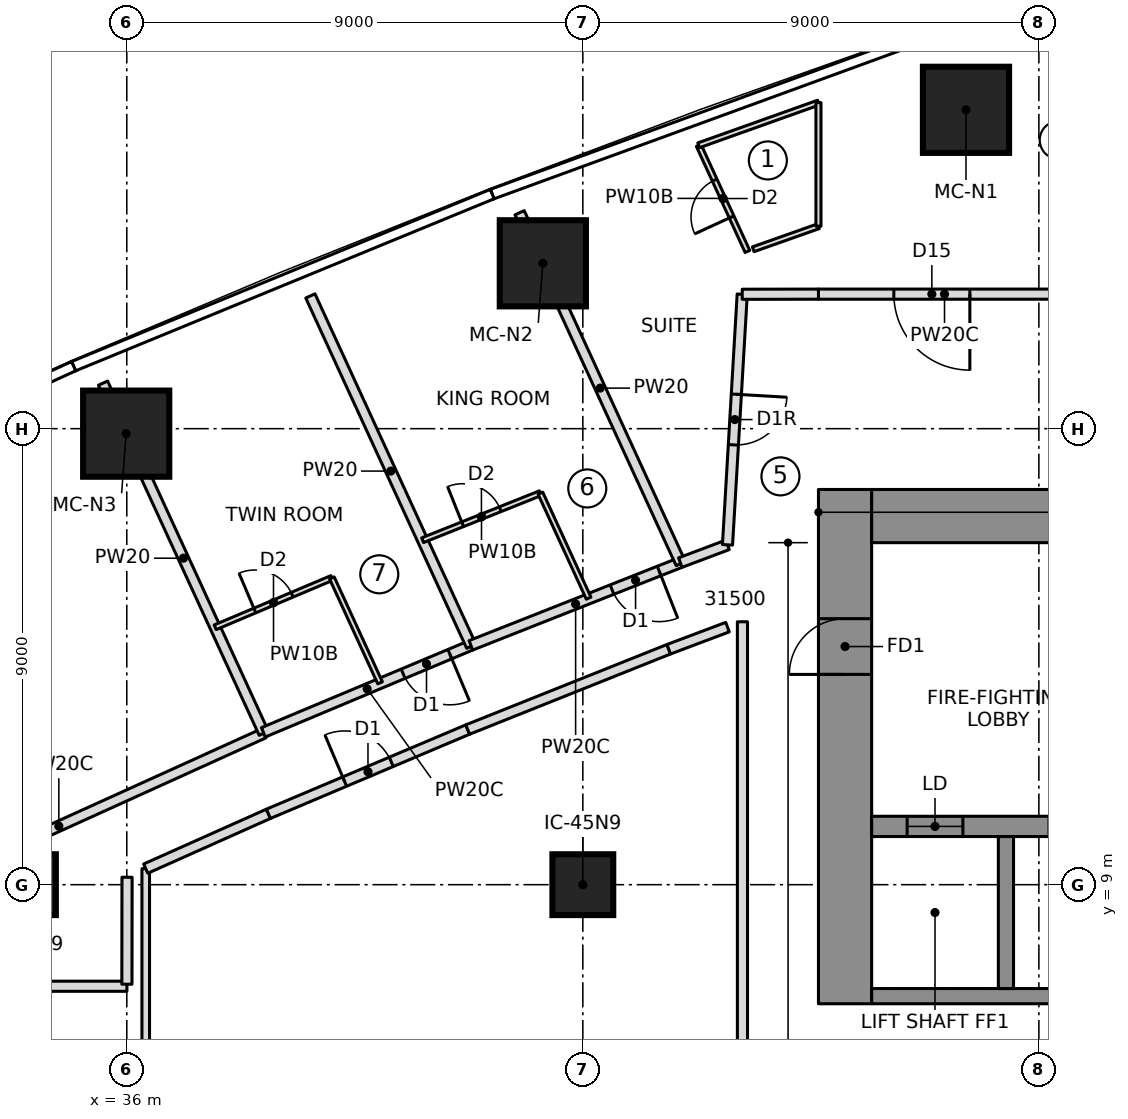
"""IFC4 building model, lengths in metres.
Left out: names, types, materials, properties, quantities, classifications, styles, units other than length and angle.
Written with IfcOpenShell. Run it as: python <this file> out.ifc"""

import sys

from ifc_helpers import new_model, si_unit, direction, frame, frame_2d, origin, origin_2d, place, context, subcontext, project, spatial, rectangle, extrude, element, fill, save


model = new_model("IFC4")
c1 = context("Model", 3, precision=1e-05, world=origin(), true_north=direction((0.0, 1.0)))
c2 = subcontext(c1, "Body", "Model", "MODEL_VIEW")
j1 = project(units=[si_unit("LENGTHUNIT", "METRE"), si_unit("PLANEANGLEUNIT", "RADIAN")], contexts=[c1])
p1 = place(None, origin())
s1 = spatial("IfcSite", under=j1, at=p1, CompositionType="ELEMENT")
p2 = place(p1, origin())
s2 = spatial("IfcBuilding", under=s1, at=p2, CompositionType="ELEMENT")
p3 = place(p2, frame((0.0, 0.0, 99.1)))
s3 = spatial("IfcBuildingStorey", under=s2, at=p3, CompositionType="ELEMENT", Elevation=99.1)
p4 = place(p3, frame((50.175, 6.65, 0.0), z_axis=(0.0, 0.0, 1.0), x_axis=(0.0, 1.0, 0.0)))
e1 = element("IfcWall", 1, at=p4, inside=s3, PredefinedType="SHEAR", context=c2, shape_type="SweptSolid", body=[
    extrude(rectangle(XDim=10.15, YDim=1.05, at=frame_2d((5.075, 0.0))), origin(), (0.0, 0.0, 1.0), 3.55),
])
p5 = place(p4, frame((6.5, 0.0, 0.0)))
e2 = element("IfcOpeningElement", 2, at=p5, cuts=e1, PredefinedType="OPENING", context=c2, shape_type="SweptSolid", body=[
    extrude(rectangle(XDim=1.1, YDim=2.1, at=frame_2d((0.55, 1.05))), frame((0.0, 0.535, 0.0), z_axis=(0.0, -1.0, 0.0), x_axis=(1.0, 0.0, 0.0)), (0.0, 0.0, 1.0), 1.07),
])
p6 = place(p3, frame((50.7, 16.275, 0.0), z_axis=(0.0, 0.0, 1.0), x_axis=(1.0, 0.0, 0.0)))
e3 = element("IfcWall", 3, at=p6, inside=s3, PredefinedType="SHEAR", context=c2, shape_type="SweptSolid", body=[
    extrude(rectangle(XDim=14.07, YDim=1.05, at=frame_2d((7.035, 0.0))), origin(), (0.0, 0.0, 1.0), 3.55),
])
p7 = place(p3, frame((50.7, 10.15, 0.0), z_axis=(0.0, 0.0, 1.0), x_axis=(1.0, 0.0, 0.0)))
e4 = element("IfcWall", 4, at=p7, inside=s3, PredefinedType="SHEAR", context=c2, shape_type="SweptSolid", body=[
    extrude(rectangle(XDim=13.02, YDim=0.4, at=frame_2d((6.51, 0.0))), origin(), (0.0, 0.0, 1.0), 3.55),
])
p8 = place(p7, frame((0.7, 0.0, 0.0)))
e5 = element("IfcOpeningElement", 5, at=p8, cuts=e4, PredefinedType="OPENING", context=c2, shape_type="SweptSolid", body=[
    extrude(rectangle(XDim=1.1, YDim=2.1, at=frame_2d((0.55, 1.05))), frame((0.0, 0.21, 0.0), z_axis=(0.0, -1.0, 0.0), x_axis=(1.0, 0.0, 0.0)), (0.0, 0.0, 1.0), 0.42),
])
p9 = place(p7, frame((3.5, 0.0, 0.0)))
e6 = element("IfcOpeningElement", 6, at=p9, cuts=e4, PredefinedType="OPENING", context=c2, shape_type="SweptSolid", body=[
    extrude(rectangle(XDim=1.1, YDim=2.1, at=frame_2d((0.55, 1.05))), frame((0.0, 0.21, 0.0), z_axis=(0.0, -1.0, 0.0), x_axis=(1.0, 0.0, 0.0)), (0.0, 0.0, 1.0), 0.42),
])
p10 = place(p3, frame((50.7, 6.8, 0.0), z_axis=(0.0, 0.0, 1.0), x_axis=(1.0, 0.0, 0.0)))
e7 = element("IfcWall", 7, at=p10, inside=s3, PredefinedType="SHEAR", context=c2, shape_type="SweptSolid", body=[
    extrude(rectangle(XDim=10.9, YDim=0.3, at=frame_2d((5.45, 0.0))), origin(), (0.0, 0.0, 1.0), 3.55),
])
p11 = place(p10, frame((6.3, 0.0, 0.0)))
e8 = element("IfcOpeningElement", 8, at=p11, cuts=e7, PredefinedType="OPENING", context=c2, shape_type="SweptSolid", body=[
    extrude(rectangle(XDim=1.1, YDim=2.1, at=frame_2d((0.55, 1.05))), frame((0.0, 0.16, 0.0), z_axis=(0.0, -1.0, 0.0), x_axis=(1.0, 0.0, 0.0)), (0.0, 0.0, 1.0), 0.32),
])
p12 = place(p10, frame((9.1, 0.0, 0.0)))
e9 = element("IfcOpeningElement", 9, at=p12, cuts=e7, PredefinedType="OPENING", context=c2, shape_type="SweptSolid", body=[
    extrude(rectangle(XDim=1.1, YDim=2.1, at=frame_2d((0.55, 1.05))), frame((0.0, 0.16, 0.0), z_axis=(0.0, -1.0, 0.0), x_axis=(1.0, 0.0, 0.0)), (0.0, 0.0, 1.0), 0.32),
])
p13 = place(p3, frame((53.35, 6.95, 0.0), z_axis=(0.0, 0.0, 1.0), x_axis=(0.0, 1.0, 0.0)))
e10 = element("IfcWall", 10, at=p13, inside=s3, PredefinedType="SHEAR", context=c2, shape_type="SweptSolid", body=[
    extrude(rectangle(XDim=3.0, YDim=0.3, at=frame_2d((1.5, 0.0))), origin(), (0.0, 0.0, 1.0), 3.55),
])
for number, where, z_axis, x_axis in (
    (11, (52.562, 24.293, 0.0), (0.0, 0.0, 1.0), (1.0, 0.0, 0.0)),
    (12, (44.211, 21.264, 0.0), (0.0, 0.0, 1.0), (1.0, 0.0, 0.0)),
    (13, (35.988, 17.902, 0.0), (0.0, 0.0, 1.0), (1.0, 0.0, 0.0)),
):
    element("IfcColumn", number, at=place(p3, frame(where, z_axis=z_axis, x_axis=x_axis)), inside=s3, PredefinedType="COLUMN", context=c2, shape_type="SweptSolid", body=[
        extrude(rectangle(XDim=1.7, YDim=1.7, at=origin_2d()), origin(), (0.0, 0.0, 1.0), 3.55),
    ])
for number, where, z_axis, x_axis in (
    (14, (34.0, 9.0, 0.0), (0.0, 0.0, 1.0), (1.0, 0.0, 0.0)),
    (15, (45.0, 9.0, 0.0), (0.0, 0.0, 1.0), (1.0, 0.0, 0.0)),
):
    element("IfcColumn", number, at=place(p3, frame(where, z_axis=z_axis, x_axis=x_axis)), inside=s3, PredefinedType="COLUMN", context=c2, shape_type="SweptSolid", body=[
        extrude(rectangle(XDim=1.2, YDim=1.2, at=origin_2d()), origin(), (0.0, 0.0, 1.0), 3.55),
    ])
p14 = place(p3, frame((30.614, 8.32, 0.0), z_axis=(0.0, 0.0, 1.0), x_axis=(0.910751030363, 0.41295588226, 0.0)))
e16 = element("IfcWall", 16, at=p14, inside=s3, PredefinedType="PARTITIONING", context=c2, shape_type="SweptSolid", body=[
    extrude(rectangle(XDim=8.883, YDim=0.2, at=frame_2d((4.442, 0.0))), origin(), (0.0, 0.0, 1.0), 3.25),
])
p15 = place(p14, frame((0.45, 0.0, 0.0)))
e17 = element("IfcOpeningElement", 17, at=p15, cuts=e16, PredefinedType="OPENING", context=c2, shape_type="SweptSolid", body=[
    extrude(rectangle(XDim=1.0, YDim=2.1, at=frame_2d((0.5, 1.05))), frame((0.0, 0.11, 0.0), z_axis=(0.0, -1.0, 0.0), x_axis=(1.0, 0.0, 0.0)), (0.0, 0.0, 1.0), 0.22),
])
p16 = place(p3, frame((38.704, 11.989, 0.0), z_axis=(0.0, 0.0, 1.0), x_axis=(-0.417416334044, 0.908715359215, 0.0)))
e18 = element("IfcWall", 18, at=p16, inside=s3, PredefinedType="PARTITIONING", context=c2, shape_type="SweptSolid", body=[
    extrude(rectangle(XDim=7.604, YDim=0.2, at=frame_2d((3.802, 0.0))), origin(), (0.0, 0.0, 1.0), 3.25),
])
p17 = place(p3, frame((42.791, 13.724, 0.0), z_axis=(0.0, 0.0, 1.0), x_axis=(-0.922230433067, -0.386640696675, 0.0)))
e19 = element("IfcWall", 19, at=p17, inside=s3, PredefinedType="PARTITIONING", context=c2, shape_type="SweptSolid", body=[
    extrude(rectangle(XDim=4.44, YDim=0.2, at=frame_2d((2.22, 0.0))), origin(), (0.0, 0.0, 1.0), 3.25),
])
p18 = place(p17, frame((0.45, 0.0, 0.0)))
e20 = element("IfcOpeningElement", 20, at=p18, cuts=e19, PredefinedType="OPENING", context=c2, shape_type="SweptSolid", body=[
    extrude(rectangle(XDim=1.0, YDim=2.1, at=frame_2d((0.5, 1.05))), frame((0.0, 0.11, 0.0), z_axis=(0.0, -1.0, 0.0), x_axis=(1.0, 0.0, 0.0)), (0.0, 0.0, 1.0), 0.22),
])
p19 = place(p3, frame((37.744, 14.08, 0.0), z_axis=(0.0, 0.0, 1.0), x_axis=(0.921042675983, 0.38946166566, 0.0)))
e21 = element("IfcWall", 21, at=p19, inside=s3, PredefinedType="PARTITIONING", context=c2, shape_type="SweptSolid", body=[
    extrude(rectangle(XDim=2.501, YDim=0.1, at=frame_2d((1.25, 0.0))), origin(), (0.0, 0.0, 1.0), 3.25),
])
p20 = place(p19, frame((0.85, 0.0, 0.0)))
e22 = element("IfcOpeningElement", 22, at=p20, cuts=e21, PredefinedType="OPENING", context=c2, shape_type="SweptSolid", body=[
    extrude(rectangle(XDim=0.8, YDim=2.1, at=frame_2d((0.4, 1.05))), frame((0.0, 0.06, 0.0), z_axis=(0.0, -1.0, 0.0), x_axis=(1.0, 0.0, 0.0)), (0.0, 0.0, 1.0), 0.12),
])
p21 = place(p3, frame((40.048, 15.054, 0.0), z_axis=(0.0, 0.0, 1.0), x_axis=(0.417433204355, -0.908707609686, 0.0)))
e23 = element("IfcWall", 23, at=p21, inside=s3, PredefinedType="PARTITIONING", context=c2, shape_type="SweptSolid", body=[
    extrude(rectangle(XDim=2.278, YDim=0.1, at=frame_2d((1.139, 0.0))), origin(), (0.0, 0.0, 1.0), 3.25),
])
p22 = place(p3, frame((42.799, 13.705, 0.0), z_axis=(0.0, 0.0, 1.0), x_axis=(-0.417427858403, 0.908710065438, 0.0)))
e24 = element("IfcWall", 24, at=p22, inside=s3, PredefinedType="PARTITIONING", context=c2, shape_type="SweptSolid", body=[
    extrude(rectangle(XDim=7.61, YDim=0.2, at=frame_2d((3.805, 0.0))), origin(), (0.0, 0.0, 1.0), 3.25),
])
p23 = place(p3, frame((46.924, 15.357, 0.0), z_axis=(0.0, 0.0, 1.0), x_axis=(-0.930040633249, -0.367456692014, 0.0)))
e25 = element("IfcWall", 25, at=p23, inside=s3, PredefinedType="PARTITIONING", context=c2, shape_type="SweptSolid", body=[
    extrude(rectangle(XDim=4.444, YDim=0.2, at=frame_2d((2.222, 0.0))), origin(), (0.0, 0.0, 1.0), 3.25),
])
p24 = place(p23, frame((0.45, 0.0, 0.0)))
e26 = element("IfcOpeningElement", 26, at=p24, cuts=e25, PredefinedType="OPENING", context=c2, shape_type="SweptSolid", body=[
    extrude(rectangle(XDim=1.0, YDim=2.1, at=frame_2d((0.5, 1.05))), frame((0.0, 0.11, 0.0), z_axis=(0.0, -1.0, 0.0), x_axis=(1.0, 0.0, 0.0)), (0.0, 0.0, 1.0), 0.22),
])
p25 = place(p3, frame((41.838, 15.798, 0.0), z_axis=(0.0, 0.0, 1.0), x_axis=(0.928638024739, 0.370987087388, 0.0)))
e27 = element("IfcWall", 27, at=p25, inside=s3, PredefinedType="PARTITIONING", context=c2, shape_type="SweptSolid", body=[
    extrude(rectangle(XDim=2.503, YDim=0.1, at=frame_2d((1.252, 0.0))), origin(), (0.0, 0.0, 1.0), 3.25),
])
p26 = place(p25, frame((0.85, 0.0, 0.0)))
e28 = element("IfcOpeningElement", 28, at=p26, cuts=e27, PredefinedType="OPENING", context=c2, shape_type="SweptSolid", body=[
    extrude(rectangle(XDim=0.8, YDim=2.1, at=frame_2d((0.4, 1.05))), frame((0.0, 0.06, 0.0), z_axis=(0.0, -1.0, 0.0), x_axis=(1.0, 0.0, 0.0)), (0.0, 0.0, 1.0), 0.12),
])
p27 = place(p3, frame((44.163, 16.727, 0.0), z_axis=(0.0, 0.0, 1.0), x_axis=(0.417373525971, -0.908735021785, 0.0)))
e29 = element("IfcWall", 29, at=p27, inside=s3, PredefinedType="PARTITIONING", context=c2, shape_type="SweptSolid", body=[
    extrude(rectangle(XDim=2.28, YDim=0.1, at=frame_2d((1.14, 0.0))), origin(), (0.0, 0.0, 1.0), 3.25),
])
p28 = place(p3, frame((46.933, 15.339, 0.0), z_axis=(0.0, 0.0, 1.0), x_axis=(-0.417437957167, 0.908705426371, 0.0)))
e30 = element("IfcWall", 30, at=p28, inside=s3, PredefinedType="PARTITIONING", context=c2, shape_type="SweptSolid", body=[
    extrude(rectangle(XDim=7.619, YDim=0.2, at=frame_2d((3.81, 0.0))), origin(), (0.0, 0.0, 1.0), 3.25),
])
p29 = place(p3, frame((49.65, 21.996, 0.0), z_axis=(0.0, 0.0, 1.0), x_axis=(-0.942692856107, -0.333661773425, 0.0)))
e31 = element("IfcWall", 31, at=p29, inside=s3, PredefinedType="PARTITIONING", context=c2, shape_type="SweptSolid", body=[
    extrude(rectangle(XDim=1.365, YDim=0.1, at=frame_2d((0.683, 0.0))), origin(), (0.0, 0.0, 1.0), 3.25),
])
p30 = place(p3, frame((48.249, 21.497, 0.0), z_axis=(0.0, 0.0, 1.0), x_axis=(-0.41749308293, 0.908680100864, 0.0)))
e32 = element("IfcWall", 32, at=p30, inside=s3, PredefinedType="PARTITIONING", context=c2, shape_type="SweptSolid", body=[
    extrude(rectangle(XDim=2.306, YDim=0.1, at=frame_2d((1.153, 0.0))), origin(), (0.0, 0.0, 1.0), 3.25),
])
p31 = place(p30, frame((0.75, 0.0, 0.0)))
e33 = element("IfcOpeningElement", 33, at=p31, cuts=e32, PredefinedType="OPENING", context=c2, shape_type="SweptSolid", body=[
    extrude(rectangle(XDim=0.8, YDim=2.1, at=frame_2d((0.4, 1.05))), frame((0.0, 0.06, 0.0), z_axis=(0.0, -1.0, 0.0), x_axis=(1.0, 0.0, 0.0)), (0.0, 0.0, 1.0), 0.12),
])
p32 = place(p3, frame((36.374, -9.317, 0.0), z_axis=(0.0, 0.0, 1.0), x_axis=(0.0, 1.0, 0.0)))
e34 = element("IfcWall", 34, at=p32, inside=s3, PredefinedType="PARTITIONING", context=c2, shape_type="SweptSolid", body=[
    extrude(rectangle(XDim=18.634, YDim=0.15, at=frame_2d((9.317, 0.0))), origin(), (0.0, 0.0, 1.0), 3.25),
])
p33 = place(p3, frame((38.792, 10.397, 0.0), z_axis=(0.0, 0.0, 1.0), x_axis=(0.921037415532, 0.389474105929, 0.0)))
e35 = element("IfcWall", 35, at=p33, inside=s3, PredefinedType="PARTITIONING", context=c2, shape_type="SweptSolid", body=[
    extrude(rectangle(XDim=4.273, YDim=0.2, at=frame_2d((2.137, 0.0))), origin(), (0.0, 0.0, 1.0), 3.25),
])
p34 = place(p33, frame((1.636, 0.0, 0.0)))
e36 = element("IfcOpeningElement", 36, at=p34, cuts=e35, PredefinedType="OPENING", context=c2, shape_type="SweptSolid", body=[
    extrude(rectangle(XDim=1.0, YDim=2.1, at=frame_2d((0.5, 1.05))), frame((0.0, 0.11, 0.0), z_axis=(0.0, -1.0, 0.0), x_axis=(1.0, 0.0, 0.0)), (0.0, 0.0, 1.0), 0.22),
])
p35 = place(p3, frame((42.728, 12.062, 0.0), z_axis=(0.0, 0.0, 1.0), x_axis=(0.928638161177, 0.370986745864, 0.0)))
e37 = element("IfcWall", 37, at=p35, inside=s3, PredefinedType="PARTITIONING", context=c2, shape_type="SweptSolid", body=[
    extrude(rectangle(XDim=4.273, YDim=0.2, at=frame_2d((2.136, 0.0))), origin(), (0.0, 0.0, 1.0), 3.25),
])
p36 = place(p3, frame((36.374, 9.317, 0.0), z_axis=(0.0, 0.0, 1.0), x_axis=(0.913030623494, 0.407891015544, 0.0)))
e38 = element("IfcWall", 38, at=p36, inside=s3, PredefinedType="PARTITIONING", context=c2, shape_type="SweptSolid", body=[
    extrude(rectangle(XDim=2.648, YDim=0.2, at=frame_2d((1.324, 0.0))), origin(), (0.0, 0.0, 1.0), 3.25),
])
p37 = place(p3, frame((54.625, 20.655, 0.0), z_axis=(0.0, 0.0, 1.0), x_axis=(-1.0, 0.0, 0.0)))
e39 = element("IfcWall", 39, at=p37, inside=s3, PredefinedType="PARTITIONING", context=c2, shape_type="SweptSolid", body=[
    extrude(rectangle(XDim=4.976, YDim=0.2, at=frame_2d((2.488, 0.0))), origin(), (0.0, 0.0, 1.0), 3.25),
])
p38 = place(p37, frame((1.988, 0.0, 0.0)))
e40 = element("IfcOpeningElement", 40, at=p38, cuts=e39, PredefinedType="OPENING", context=c2, shape_type="SweptSolid", body=[
    extrude(rectangle(XDim=1.5, YDim=2.1, at=frame_2d((0.75, 1.05))), frame((0.0, 0.11, 0.0), z_axis=(0.0, -1.0, 0.0), x_axis=(1.0, 0.0, 0.0)), (0.0, 0.0, 1.0), 0.22),
])
p39 = place(p3, frame((47.286, 23.592, 0.0), z_axis=(0.0, 0.0, 1.0), x_axis=(0.941933231826, 0.335800218555, 0.0)))
e41 = element("IfcWall", 41, at=p39, inside=s3, PredefinedType="PARTITIONING", context=c2, shape_type="SweptSolid", body=[
    extrude(rectangle(XDim=2.51, YDim=0.1, at=frame_2d((1.255, 0.0))), origin(), (0.0, 0.0, 1.0), 3.25),
])
p40 = place(p3, frame((49.65, 24.435, 0.0), z_axis=(0.0, 0.0, 1.0), x_axis=(0.0, -1.0, 0.0)))
e42 = element("IfcWall", 42, at=p40, inside=s3, PredefinedType="PARTITIONING", context=c2, shape_type="SweptSolid", body=[
    extrude(rectangle(XDim=2.439, YDim=0.1, at=frame_2d((1.22, 0.0))), origin(), (0.0, 0.0, 1.0), 3.25),
])
p41 = place(p3, frame((47.855, 15.707, 0.0), z_axis=(0.0, 0.0, 1.0), x_axis=(-0.935803526171, -0.35252199989, 0.0)))
e43 = element("IfcWall", 43, at=p41, inside=s3, PredefinedType="PARTITIONING", context=c2, shape_type="SweptSolid", body=[
    extrude(rectangle(XDim=0.995, YDim=0.2, at=frame_2d((0.497, 0.0))), origin(), (0.0, 0.0, 1.0), 3.25),
])
p42 = place(p3, frame((46.696, 13.647, 0.0), z_axis=(0.0, 0.0, 1.0), x_axis=(0.935907269358, 0.352246480696, 0.0)))
e44 = element("IfcWall", 44, at=p42, inside=s3, PredefinedType="PARTITIONING", context=c2, shape_type="SweptSolid", body=[
    extrude(rectangle(XDim=1.239, YDim=0.2, at=frame_2d((0.619, 0.0))), origin(), (0.0, 0.0, 1.0), 3.25),
])
p43 = place(p3, frame((48.146, 20.652, 0.0), z_axis=(0.0, 0.0, 1.0), x_axis=(-0.058649792989, -0.998278619315, 0.0)))
e45 = element("IfcWall", 45, at=p43, inside=s3, PredefinedType="PARTITIONING", context=c2, shape_type="SweptSolid", body=[
    extrude(rectangle(XDim=4.954, YDim=0.2, at=frame_2d((2.477, 0.0))), origin(), (0.0, 0.0, 1.0), 3.25),
])
p44 = place(p43, frame((1.977, 0.0, 0.0)))
e46 = element("IfcOpeningElement", 46, at=p44, cuts=e45, PredefinedType="OPENING", context=c2, shape_type="SweptSolid", body=[
    extrude(rectangle(XDim=1.0, YDim=2.1, at=frame_2d((0.5, 1.05))), frame((0.0, 0.11, 0.0), z_axis=(0.0, -1.0, 0.0), x_axis=(1.0, 0.0, 0.0)), (0.0, 0.0, 1.0), 0.22),
])
p45 = place(p3, frame((32.0, 6.995, 0.0), z_axis=(0.0, 0.0, 1.0), x_axis=(0.99999999256, 0.00012198097, 0.0)))
e47 = element("IfcWall", 47, at=p45, inside=s3, PredefinedType="PARTITIONING", context=c2, shape_type="SweptSolid", body=[
    extrude(rectangle(XDim=4.003, YDim=0.2, at=frame_2d((2.001, 0.0))), origin(), (0.0, 0.0, 1.0), 3.25),
])
p46 = place(p3, frame((36.002, 7.036, 0.0), z_axis=(0.0, 0.0, 1.0), x_axis=(0.001156603436, 0.999999331134, 0.0)))
e48 = element("IfcWall", 48, at=p46, inside=s3, PredefinedType="PARTITIONING", context=c2, shape_type="SweptSolid", body=[
    extrude(rectangle(XDim=2.111, YDim=0.2, at=frame_2d((1.055, 0.0))), origin(), (0.0, 0.0, 1.0), 3.25),
])
p47 = place(p3, frame((48.15, 14.189, 0.0), z_axis=(0.0, 0.0, 1.0), x_axis=(0.0, -1.0, 0.0)))
e49 = element("IfcWall", 49, at=p47, inside=s3, PredefinedType="PARTITIONING", context=c2, shape_type="SweptSolid", body=[
    extrude(rectangle(XDim=28.377, YDim=0.2, at=frame_2d((14.189, 0.0))), origin(), (0.0, 0.0, 1.0), 3.25),
])
p48 = place(p3, frame((49.65, 20.655, 0.0), z_axis=(0.0, 0.0, 1.0), x_axis=(-0.999998406651, -0.001785131852, 0.0)))
e50 = element("IfcWall", 50, at=p48, inside=s3, PredefinedType="PARTITIONING", context=c2, shape_type="SweptSolid", body=[
    extrude(rectangle(XDim=1.504, YDim=0.2, at=frame_2d((0.752, 0.0))), origin(), (0.0, 0.0, 1.0), 3.25),
])
p49 = place(p20, origin())
e51 = element("IfcDoor", 51, at=p49, inside=s3, OperationType="SINGLE_SWING_LEFT", PredefinedType="DOOR", context=c2, shape_type="SweptSolid", body=[
    extrude(rectangle(XDim=0.8, YDim=2.1, at=frame_2d((0.4, 1.05))), frame((0.0, 0.025, 0.0), z_axis=(0.0, -1.0, 0.0), x_axis=(1.0, 0.0, 0.0)), (0.0, 0.0, 1.0), 0.05),
])
fill(e22, e51)
p50 = place(p18, origin())
e52 = element("IfcDoor", 52, at=p50, inside=s3, OperationType="SINGLE_SWING_LEFT", PredefinedType="DOOR", context=c2, shape_type="SweptSolid", body=[
    extrude(rectangle(XDim=1.0, YDim=2.1, at=frame_2d((0.5, 1.05))), frame((0.0, 0.025, 0.0), z_axis=(0.0, -1.0, 0.0), x_axis=(1.0, 0.0, 0.0)), (0.0, 0.0, 1.0), 0.05),
])
fill(e20, e52)
p51 = place(p26, origin())
e53 = element("IfcDoor", 53, at=p51, inside=s3, OperationType="SINGLE_SWING_LEFT", PredefinedType="DOOR", context=c2, shape_type="SweptSolid", body=[
    extrude(rectangle(XDim=0.8, YDim=2.1, at=frame_2d((0.4, 1.05))), frame((0.0, 0.025, 0.0), z_axis=(0.0, -1.0, 0.0), x_axis=(1.0, 0.0, 0.0)), (0.0, 0.0, 1.0), 0.05),
])
fill(e28, e53)
p52 = place(p24, origin())
e54 = element("IfcDoor", 54, at=p52, inside=s3, OperationType="SINGLE_SWING_LEFT", PredefinedType="DOOR", context=c2, shape_type="SweptSolid", body=[
    extrude(rectangle(XDim=1.0, YDim=2.1, at=frame_2d((0.5, 1.05))), frame((0.0, 0.025, 0.0), z_axis=(0.0, -1.0, 0.0), x_axis=(1.0, 0.0, 0.0)), (0.0, 0.0, 1.0), 0.05),
])
fill(e26, e54)
p53 = place(p31, origin())
e55 = element("IfcDoor", 55, at=p53, inside=s3, OperationType="SINGLE_SWING_LEFT", PredefinedType="DOOR", context=c2, shape_type="SweptSolid", body=[
    extrude(rectangle(XDim=0.8, YDim=2.1, at=frame_2d((0.4, 1.05))), frame((0.0, 0.025, 0.0), z_axis=(0.0, -1.0, 0.0), x_axis=(1.0, 0.0, 0.0)), (0.0, 0.0, 1.0), 0.05),
])
fill(e33, e55)
p54 = place(p34, origin())
e56 = element("IfcDoor", 56, at=p54, inside=s3, OperationType="SINGLE_SWING_LEFT", PredefinedType="DOOR", context=c2, shape_type="SweptSolid", body=[
    extrude(rectangle(XDim=1.0, YDim=2.1, at=frame_2d((0.5, 1.05))), frame((0.0, 0.025, 0.0), z_axis=(0.0, -1.0, 0.0), x_axis=(1.0, 0.0, 0.0)), (0.0, 0.0, 1.0), 0.05),
])
fill(e36, e56)
p55 = place(p38, origin())
e57 = element("IfcDoor", 57, at=p55, inside=s3, OperationType="DOUBLE_DOOR_SINGLE_SWING", PredefinedType="DOOR", context=c2, shape_type="SweptSolid", body=[
    extrude(rectangle(XDim=1.5, YDim=2.1, at=frame_2d((0.75, 1.05))), frame((0.0, 0.025, 0.0), z_axis=(0.0, -1.0, 0.0), x_axis=(1.0, 0.0, 0.0)), (0.0, 0.0, 1.0), 0.05),
])
fill(e40, e57)
p56 = place(p44, origin())
e58 = element("IfcDoor", 58, at=p56, inside=s3, OperationType="SINGLE_SWING_RIGHT", PredefinedType="DOOR", context=c2, shape_type="SweptSolid", body=[
    extrude(rectangle(XDim=1.0, YDim=2.1, at=frame_2d((0.5, 1.05))), frame((0.0, 0.025, 0.0), z_axis=(0.0, -1.0, 0.0), x_axis=(1.0, 0.0, 0.0)), (0.0, 0.0, 1.0), 0.05),
])
fill(e46, e58)
p57 = place(p8, origin())
e59 = element("IfcDoor", 59, at=p57, inside=s3, OperationType="DOUBLE_DOOR_SLIDING", PredefinedType="DOOR", context=c2, shape_type="SweptSolid", body=[
    extrude(rectangle(XDim=1.1, YDim=2.1, at=frame_2d((0.55, 1.05))), frame((0.0, 0.025, 0.0), z_axis=(0.0, -1.0, 0.0), x_axis=(1.0, 0.0, 0.0)), (0.0, 0.0, 1.0), 0.05),
])
fill(e5, e59)
p58 = place(p5, origin())
e60 = element("IfcDoor", 60, at=p58, inside=s3, OperationType="SINGLE_SWING_RIGHT", PredefinedType="DOOR", context=c2, shape_type="SweptSolid", body=[
    extrude(rectangle(XDim=1.1, YDim=2.1, at=frame_2d((0.55, 1.05))), frame((0.0, 0.025, 0.0), z_axis=(0.0, -1.0, 0.0), x_axis=(1.0, 0.0, 0.0)), (0.0, 0.0, 1.0), 0.05),
])
fill(e2, e60)
save(model, sys.argv[1])
